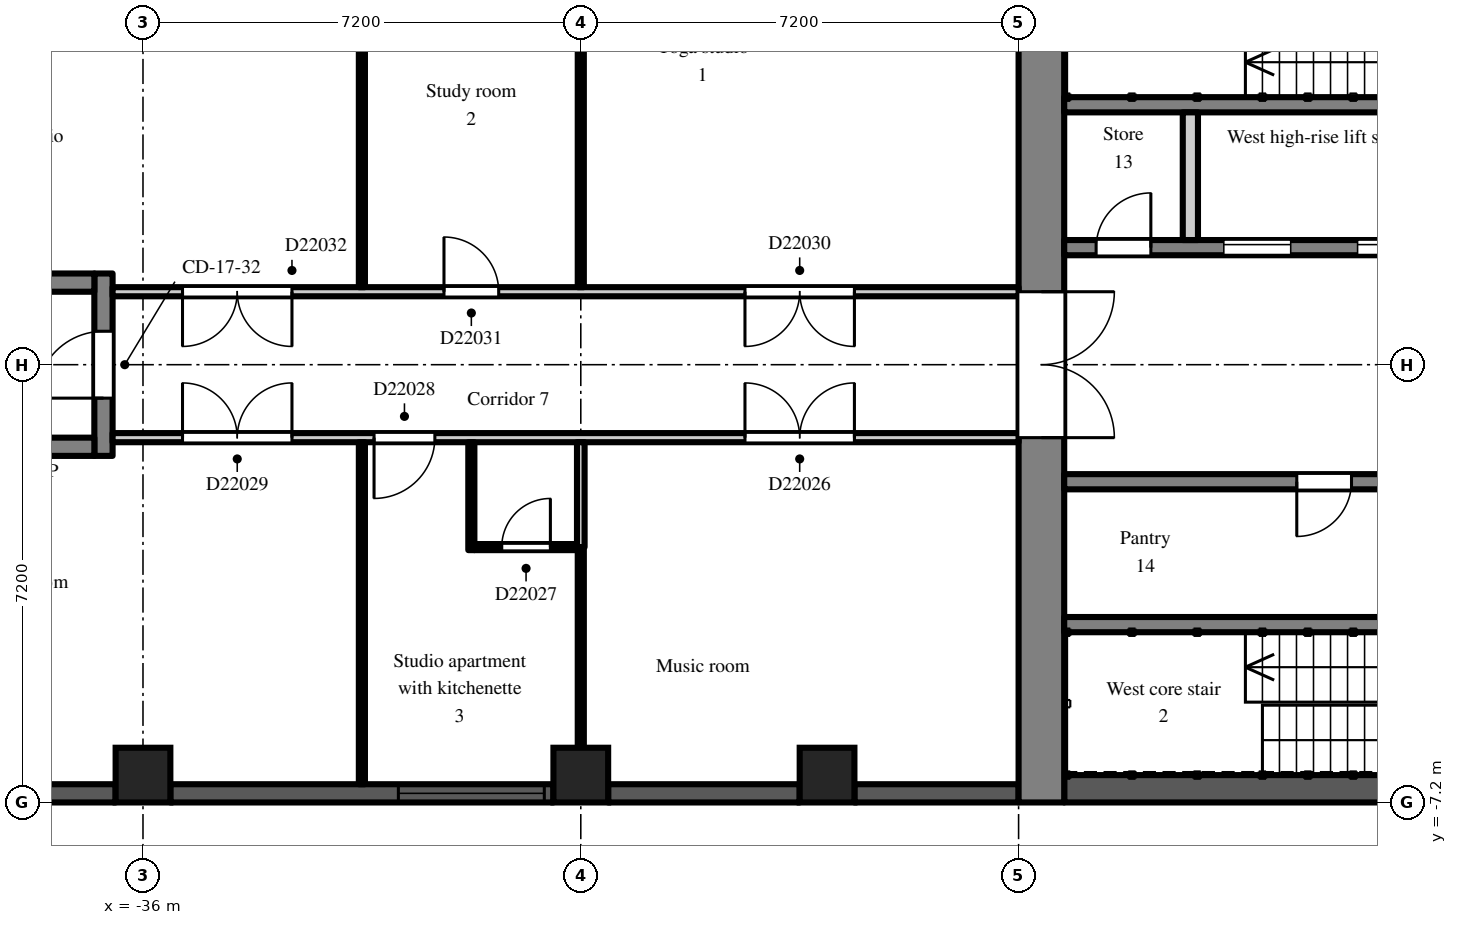
"""IFC4 building model, lengths in metres.
Left out: names, types, materials, properties, quantities, classifications, styles, units other than length and angle.
Written with IfcOpenShell. Run it as: python <this file> out.ifc"""

import sys

from ifc_helpers import new_model, si_unit, direction, frame, frame_2d, origin, origin_2d, place, context, subcontext, project, spatial, rectangle, extrude, element, fill, save


model = new_model("IFC4")
c1 = context("Model", 3, precision=1e-05, world=origin(), true_north=direction((0.0, 1.0)))
c2 = subcontext(c1, "Body", "Model", "MODEL_VIEW")
j1 = project(units=[si_unit("LENGTHUNIT", "METRE"), si_unit("PLANEANGLEUNIT", "RADIAN")], contexts=[c1])
p1 = place(None, origin())
s1 = spatial("IfcSite", under=j1, at=p1, CompositionType="ELEMENT")
p2 = place(p1, origin())
s2 = spatial("IfcBuilding", under=s1, at=p2, CompositionType="ELEMENT")
p3 = place(p2, frame((0.0, 0.0, 156.3)))
s3 = spatial("IfcBuildingStorey", under=s2, at=p3, CompositionType="ELEMENT", Elevation=156.3)
for number, where, z_axis, x_axis in (
    (1, (-36.0, -6.75, 0.0), (0.0, 0.0, 1.0), (1.0, 0.0, 0.0)),
    (2, (-28.8, -6.75, 0.0), (0.0, 0.0, 1.0), (1.0, 0.0, 0.0)),
    (3, (-24.75, -6.75, 0.0), (0.0, 0.0, 1.0), (1.0, 0.0, 0.0)),
):
    element("IfcColumn", number, at=place(p3, frame(where, z_axis=z_axis, x_axis=x_axis)), inside=s3, PredefinedType="COLUMN", context=c2, shape_type="SweptSolid", body=[
        extrude(rectangle(XDim=0.9, YDim=0.9, at=origin_2d()), origin(), (0.0, 0.0, 1.0), 3.0),
    ])
p4 = place(p3, frame((-38.7, -7.05, 0.0), z_axis=(0.0, 0.0, 1.0), x_axis=(1.0, 0.0, 0.0)))
e4 = element("IfcWall", 4, at=p4, inside=s3, PredefinedType="SOLIDWALL", context=c2, shape_type="SweptSolid", body=[
    extrude(rectangle(XDim=2.25, YDim=0.3, at=frame_2d((1.125, 0.0))), origin(), (0.0, 0.0, 1.0), 2.2),
])
p5 = place(p3, frame((-35.55, -7.05, 0.0), z_axis=(0.0, 0.0, 1.0), x_axis=(1.0, 0.0, 0.0)))
e5 = element("IfcWall", 5, at=p5, inside=s3, PredefinedType="SOLIDWALL", context=c2, shape_type="SweptSolid", body=[
    extrude(rectangle(XDim=6.3, YDim=0.3, at=frame_2d((3.15, 0.0))), origin(), (0.0, 0.0, 1.0), 2.2),
])
p6 = place(p5, frame((3.75, 0.0, 0.2)))
e6 = element("IfcOpeningElement", 6, at=p6, cuts=e5, PredefinedType="OPENING", context=c2, shape_type="SweptSolid", body=[
    extrude(rectangle(XDim=2.4, YDim=1.85, at=frame_2d((1.2, 0.925))), frame((0.0, 0.16, 0.0), z_axis=(0.0, -1.0, 0.0), x_axis=(1.0, 0.0, 0.0)), (0.0, 0.0, 1.0), 0.32),
])
p7 = place(p3, frame((-28.35, -7.05, 0.0), z_axis=(0.0, 0.0, 1.0), x_axis=(1.0, 0.0, 0.0)))
e7 = element("IfcWall", 7, at=p7, inside=s3, PredefinedType="SOLIDWALL", context=c2, shape_type="SweptSolid", body=[
    extrude(rectangle(XDim=3.15, YDim=0.3, at=frame_2d((1.575, 0.0))), origin(), (0.0, 0.0, 1.0), 2.2),
])
p8 = place(p3, frame((-24.3, -7.05, 0.0), z_axis=(0.0, 0.0, 1.0), x_axis=(1.0, 0.0, 0.0)))
e8 = element("IfcWall", 8, at=p8, inside=s3, PredefinedType="SOLIDWALL", context=c2, shape_type="SweptSolid", body=[
    extrude(rectangle(XDim=2.7, YDim=0.3, at=frame_2d((1.35, 0.0))), origin(), (0.0, 0.0, 1.0), 2.2),
])
p9 = place(p3, frame((-21.225, -7.2, 0.0), z_axis=(0.0, 0.0, 1.0), x_axis=(0.0, 1.0, 0.0)))
e9 = element("IfcWall", 9, at=p9, inside=s3, PredefinedType="SHEAR", context=c2, shape_type="SweptSolid", body=[
    extrude(rectangle(XDim=14.4, YDim=0.75, at=frame_2d((7.2, 0.0))), origin(), (0.0, 0.0, 1.0), 2.6),
])
p10 = place(p9, frame((6.0, 0.0, 0.0)))
e10 = element("IfcOpeningElement", 10, at=p10, cuts=e9, PredefinedType="OPENING", context=c2, shape_type="SweptSolid", body=[
    extrude(rectangle(XDim=2.4, YDim=2.2, at=frame_2d((1.2, 1.1))), frame((0.0, 0.385, 0.0), z_axis=(0.0, -1.0, 0.0), x_axis=(1.0, 0.0, 0.0)), (0.0, 0.0, 1.0), 0.77),
])
p11 = place(p3, frame((-7.9, 1.925, 0.0), z_axis=(0.0, 0.0, 1.0), x_axis=(-1.0, 0.0, 0.0)))
e11 = element("IfcWall", 11, at=p11, inside=s3, PredefinedType="SHEAR", context=c2, shape_type="SweptSolid", body=[
    extrude(rectangle(XDim=12.95, YDim=0.25, at=frame_2d((6.475, 0.0))), origin(), (0.0, 0.0, 1.0), 2.6),
])
p12 = place(p11, frame((4.825, 0.0, 0.0)))
e12 = element("IfcOpeningElement", 12, at=p12, cuts=e11, PredefinedType="OPENING", context=c2, shape_type="SweptSolid", body=[
    extrude(rectangle(XDim=1.1, YDim=2.1, at=frame_2d((0.55, 1.05))), frame((0.0, 0.135, 0.0), z_axis=(0.0, -1.0, 0.0), x_axis=(1.0, 0.0, 0.0)), (0.0, 0.0, 1.0), 0.27),
])
p13 = place(p11, frame((7.025, 0.0, 0.0)))
e13 = element("IfcOpeningElement", 13, at=p13, cuts=e11, PredefinedType="OPENING", context=c2, shape_type="SweptSolid", body=[
    extrude(rectangle(XDim=1.1, YDim=2.1, at=frame_2d((0.55, 1.05))), frame((0.0, 0.135, 0.0), z_axis=(0.0, -1.0, 0.0), x_axis=(1.0, 0.0, 0.0)), (0.0, 0.0, 1.0), 0.27),
])
p14 = place(p11, frame((9.225, 0.0, 0.0)))
e14 = element("IfcOpeningElement", 14, at=p14, cuts=e11, PredefinedType="OPENING", context=c2, shape_type="SweptSolid", body=[
    extrude(rectangle(XDim=1.1, YDim=2.1, at=frame_2d((0.55, 1.05))), frame((0.0, 0.135, 0.0), z_axis=(0.0, -1.0, 0.0), x_axis=(1.0, 0.0, 0.0)), (0.0, 0.0, 1.0), 0.27),
])
p15 = place(p11, frame((0.525, 0.0, 0.0)))
e15 = element("IfcOpeningElement", 15, at=p15, cuts=e11, PredefinedType="OPENING", context=c2, shape_type="SweptSolid", body=[
    extrude(rectangle(XDim=0.9, YDim=2.1, at=frame_2d((0.45, 1.05))), frame((0.0, 0.135, 0.0), z_axis=(0.0, -1.0, 0.0), x_axis=(1.0, 0.0, 0.0)), (0.0, 0.0, 1.0), 0.27),
])
p16 = place(p11, frame((2.625, 0.0, 0.0)))
e16 = element("IfcOpeningElement", 16, at=p16, cuts=e11, PredefinedType="OPENING", context=c2, shape_type="SweptSolid", body=[
    extrude(rectangle(XDim=1.1, YDim=2.1, at=frame_2d((0.55, 1.05))), frame((0.0, 0.135, 0.0), z_axis=(0.0, -1.0, 0.0), x_axis=(1.0, 0.0, 0.0)), (0.0, 0.0, 1.0), 0.27),
])
p17 = place(p11, frame((11.525, 0.0, 0.0)))
e17 = element("IfcOpeningElement", 17, at=p17, cuts=e11, PredefinedType="OPENING", context=c2, shape_type="SweptSolid", body=[
    extrude(rectangle(XDim=0.9, YDim=2.1, at=frame_2d((0.45, 1.05))), frame((0.0, 0.135, 0.0), z_axis=(0.0, -1.0, 0.0), x_axis=(1.0, 0.0, 0.0)), (0.0, 0.0, 1.0), 0.27),
])
p18 = place(p3, frame((-12.3, 4.275, 0.0), z_axis=(0.0, 0.0, 1.0), x_axis=(-1.0, 0.0, 0.0)))
e18 = element("IfcWall", 18, at=p18, inside=s3, PredefinedType="SHEAR", context=c2, shape_type="SweptSolid", body=[
    extrude(rectangle(XDim=8.55, YDim=0.25, at=frame_2d((4.275, 0.0))), origin(), (0.0, 0.0, 1.0), 2.6),
])
p19 = place(p3, frame((-18.775, 2.05, 0.0), z_axis=(0.0, 0.0, 1.0), x_axis=(0.0, 1.0, 0.0)))
e19 = element("IfcWall", 19, at=p19, inside=s3, PredefinedType="PARTITIONING", context=c2, shape_type="SweptSolid", body=[
    extrude(rectangle(XDim=2.1, YDim=0.25, at=frame_2d((1.05, 0.0))), origin(), (0.0, 0.0, 1.0), 2.6),
])
p20 = place(p3, frame((-7.9, -6.975, 0.0), z_axis=(0.0, 0.0, 1.0), x_axis=(-1.0, 0.0, 0.0)))
e20 = element("IfcWall", 20, at=p20, inside=s3, PredefinedType="SHEAR", context=c2, shape_type="SweptSolid", body=[
    extrude(rectangle(XDim=12.95, YDim=0.45, at=frame_2d((6.475, 0.0))), origin(), (0.0, 0.0, 1.0), 2.6),
])
p21 = place(p3, frame((-7.9, -1.925, 0.0), z_axis=(0.0, 0.0, 1.0), x_axis=(-1.0, 0.0, 0.0)))
e21 = element("IfcWall", 21, at=p21, inside=s3, PredefinedType="SHEAR", context=c2, shape_type="SweptSolid", body=[
    extrude(rectangle(XDim=12.95, YDim=0.25, at=frame_2d((6.475, 0.0))), origin(), (0.0, 0.0, 1.0), 2.6),
])
p22 = place(p21, frame((0.525, 0.0, 0.0)))
e22 = element("IfcOpeningElement", 22, at=p22, cuts=e21, PredefinedType="OPENING", context=c2, shape_type="SweptSolid", body=[
    extrude(rectangle(XDim=0.9, YDim=2.1, at=frame_2d((0.45, 1.05))), frame((0.0, 0.135, 0.0), z_axis=(0.0, -1.0, 0.0), x_axis=(1.0, 0.0, 0.0)), (0.0, 0.0, 1.0), 0.27),
])
p23 = place(p21, frame((2.625, 0.0, 0.0)))
e23 = element("IfcOpeningElement", 23, at=p23, cuts=e21, PredefinedType="OPENING", context=c2, shape_type="SweptSolid", body=[
    extrude(rectangle(XDim=1.1, YDim=2.1, at=frame_2d((0.55, 1.05))), frame((0.0, 0.135, 0.0), z_axis=(0.0, -1.0, 0.0), x_axis=(1.0, 0.0, 0.0)), (0.0, 0.0, 1.0), 0.27),
])
p24 = place(p21, frame((8.225, 0.0, 0.0)))
e24 = element("IfcOpeningElement", 24, at=p24, cuts=e21, PredefinedType="OPENING", context=c2, shape_type="SweptSolid", body=[
    extrude(rectangle(XDim=0.9, YDim=2.1, at=frame_2d((0.45, 1.05))), frame((0.0, 0.135, 0.0), z_axis=(0.0, -1.0, 0.0), x_axis=(1.0, 0.0, 0.0)), (0.0, 0.0, 1.0), 0.27),
])
p25 = place(p3, frame((-12.3, -4.275, 0.0), z_axis=(0.0, 0.0, 1.0), x_axis=(-1.0, 0.0, 0.0)))
e25 = element("IfcWall", 25, at=p25, inside=s3, PredefinedType="SHEAR", context=c2, shape_type="SweptSolid", body=[
    extrude(rectangle(XDim=8.55, YDim=0.25, at=frame_2d((4.275, 0.0))), origin(), (0.0, 0.0, 1.0), 2.6),
])
p26 = place(p3, frame((-36.65, -1.5, 0.0), z_axis=(0.0, 0.0, 1.0), x_axis=(0.0, 1.0, 0.0)))
e26 = element("IfcWall", 26, at=p26, inside=s3, PredefinedType="SHEAR", context=c2, shape_type="SweptSolid", body=[
    extrude(rectangle(XDim=3.0, YDim=0.3, at=frame_2d((1.5, 0.0))), origin(), (0.0, 0.0, 1.0), 2.6),
])
p27 = place(p26, frame((0.95, 0.0, 0.0)))
e27 = element("IfcOpeningElement", 27, at=p27, cuts=e26, PredefinedType="OPENING", context=c2, shape_type="SweptSolid", body=[
    extrude(rectangle(XDim=1.1, YDim=2.1, at=frame_2d((0.55, 1.05))), frame((0.0, 0.16, 0.0), z_axis=(0.0, -1.0, 0.0), x_axis=(1.0, 0.0, 0.0)), (0.0, 0.0, 1.0), 0.32),
])
for number, where, z_axis, x_axis in (
    (28, (-36.8, -1.35, 0.0), (0.0, 0.0, 1.0), (-1.0, 0.0, 0.0)),
    (29, (-36.8, 1.35, 0.0), (0.0, 0.0, 1.0), (-1.0, 0.0, 0.0)),
):
    element("IfcWall", number, at=place(p3, frame(where, z_axis=z_axis, x_axis=x_axis)), inside=s3, PredefinedType="SHEAR", context=c2, shape_type="SweptSolid", body=[
        extrude(rectangle(XDim=5.8, YDim=0.3, at=frame_2d((2.9, 0.0))), origin(), (0.0, 0.0, 1.0), 2.6),
    ])
p28 = place(p3, frame((-36.5, -1.2, 0.0), z_axis=(0.0, 0.0, 1.0), x_axis=(1.0, 0.0, 0.0)))
e30 = element("IfcWall", 30, at=p28, inside=s3, PredefinedType="PARTITIONING", context=c2, shape_type="SweptSolid", body=[
    extrude(rectangle(XDim=14.9, YDim=0.15, at=frame_2d((7.45, 0.0))), origin(), (0.0, 0.0, 1.0), 2.6),
])
p29 = place(p28, frame((10.4, 0.0, 0.0)))
e31 = element("IfcOpeningElement", 31, at=p29, cuts=e30, PredefinedType="OPENING", context=c2, shape_type="SweptSolid", body=[
    extrude(rectangle(XDim=1.8, YDim=2.1, at=frame_2d((0.9, 1.05))), frame((0.0, 0.085, 0.0), z_axis=(0.0, -1.0, 0.0), x_axis=(1.0, 0.0, 0.0)), (0.0, 0.0, 1.0), 0.17),
])
p30 = place(p28, frame((4.3, 0.0, 0.0)))
e32 = element("IfcOpeningElement", 32, at=p30, cuts=e30, PredefinedType="OPENING", context=c2, shape_type="SweptSolid", body=[
    extrude(rectangle(XDim=1.0, YDim=2.1, at=frame_2d((0.5, 1.05))), frame((0.0, 0.085, 0.0), z_axis=(0.0, -1.0, 0.0), x_axis=(1.0, 0.0, 0.0)), (0.0, 0.0, 1.0), 0.17),
])
p31 = place(p28, frame((1.15, 0.0, 0.0)))
e33 = element("IfcOpeningElement", 33, at=p31, cuts=e30, PredefinedType="OPENING", context=c2, shape_type="SweptSolid", body=[
    extrude(rectangle(XDim=1.8, YDim=2.1, at=frame_2d((0.9, 1.05))), frame((0.0, 0.085, 0.0), z_axis=(0.0, -1.0, 0.0), x_axis=(1.0, 0.0, 0.0)), (0.0, 0.0, 1.0), 0.17),
])
p32 = place(p3, frame((-36.5, 1.2, 0.0), z_axis=(0.0, 0.0, 1.0), x_axis=(1.0, 0.0, 0.0)))
e34 = element("IfcWall", 34, at=p32, inside=s3, PredefinedType="PARTITIONING", context=c2, shape_type="SweptSolid", body=[
    extrude(rectangle(XDim=14.9, YDim=0.15, at=frame_2d((7.45, 0.0))), origin(), (0.0, 0.0, 1.0), 2.6),
])
p33 = place(p32, frame((10.4, 0.0, 0.0)))
e35 = element("IfcOpeningElement", 35, at=p33, cuts=e34, PredefinedType="OPENING", context=c2, shape_type="SweptSolid", body=[
    extrude(rectangle(XDim=1.8, YDim=2.1, at=frame_2d((0.9, 1.05))), frame((0.0, 0.085, 0.0), z_axis=(0.0, -1.0, 0.0), x_axis=(1.0, 0.0, 0.0)), (0.0, 0.0, 1.0), 0.17),
])
p34 = place(p32, frame((5.45, 0.0, 0.0)))
e36 = element("IfcOpeningElement", 36, at=p34, cuts=e34, PredefinedType="OPENING", context=c2, shape_type="SweptSolid", body=[
    extrude(rectangle(XDim=0.9, YDim=2.1, at=frame_2d((0.45, 1.05))), frame((0.0, 0.085, 0.0), z_axis=(0.0, -1.0, 0.0), x_axis=(1.0, 0.0, 0.0)), (0.0, 0.0, 1.0), 0.17),
])
p35 = place(p32, frame((1.15, 0.0, 0.0)))
e37 = element("IfcOpeningElement", 37, at=p35, cuts=e34, PredefinedType="OPENING", context=c2, shape_type="SweptSolid", body=[
    extrude(rectangle(XDim=1.8, YDim=2.1, at=frame_2d((0.9, 1.05))), frame((0.0, 0.085, 0.0), z_axis=(0.0, -1.0, 0.0), x_axis=(1.0, 0.0, 0.0)), (0.0, 0.0, 1.0), 0.17),
])
for number, where, z_axis, x_axis in (
    (38, (-32.4, -6.9, 0.0), (0.0, 0.0, 1.0), (0.0, 1.0, 0.0)),
    (39, (-32.4, 1.275, 0.0), (0.0, 0.0, 1.0), (0.0, 1.0, 0.0)),
):
    element("IfcWall", number, at=place(p3, frame(where, z_axis=z_axis, x_axis=x_axis)), inside=s3, PredefinedType="PARTITIONING", context=c2, shape_type="SweptSolid", body=[
        extrude(rectangle(XDim=5.625, YDim=0.1, at=frame_2d((2.812, 0.0))), origin(), (0.0, 0.0, 1.0), 2.6),
    ])
p36 = place(p3, frame((-30.6, -3.05, 0.0), z_axis=(0.0, 0.0, 1.0), x_axis=(0.0, 1.0, 0.0)))
e40 = element("IfcWall", 40, at=p36, inside=s3, PredefinedType="PARTITIONING", context=c2, shape_type="SweptSolid", body=[
    extrude(rectangle(XDim=1.775, YDim=0.1, at=frame_2d((0.888, 0.0))), origin(), (0.0, 0.0, 1.0), 2.6),
])
p37 = place(p3, frame((-30.55, -3.0, 0.0), z_axis=(0.0, 0.0, 1.0), x_axis=(1.0, 0.0, 0.0)))
e41 = element("IfcWall", 41, at=p37, inside=s3, PredefinedType="PARTITIONING", context=c2, shape_type="SweptSolid", body=[
    extrude(rectangle(XDim=1.688, YDim=0.1, at=frame_2d((0.844, 0.0))), origin(), (0.0, 0.0, 1.0), 2.6),
])
p38 = place(p37, frame((0.45, 0.0, 0.0)))
e42 = element("IfcOpeningElement", 42, at=p38, cuts=e41, PredefinedType="OPENING", context=c2, shape_type="SweptSolid", body=[
    extrude(rectangle(XDim=0.8, YDim=2.1, at=frame_2d((0.4, 1.05))), frame((0.0, 0.06, 0.0), z_axis=(0.0, -1.0, 0.0), x_axis=(1.0, 0.0, 0.0)), (0.0, 0.0, 1.0), 0.12),
])
p39 = place(p3, frame((-28.8, -6.9, 0.0), z_axis=(0.0, 0.0, 1.0), x_axis=(0.0, 1.0, 0.0)))
e43 = element("IfcWall", 43, at=p39, inside=s3, PredefinedType="PARTITIONING", context=c2, shape_type="SweptSolid", body=[
    extrude(rectangle(XDim=3.9, YDim=0.1, at=frame_2d((1.95, 0.0))), origin(), (0.0, 0.0, 1.0), 2.6),
])
p40 = place(p3, frame((-28.8, -3.0, 0.0), z_axis=(0.0, 0.0, 1.0), x_axis=(0.0, 1.0, 0.0)))
e44 = element("IfcWall", 44, at=p40, inside=s3, PredefinedType="PARTITIONING", context=c2, shape_type="SweptSolid", body=[
    extrude(rectangle(XDim=1.725, YDim=0.125, at=frame_2d((0.863, 0.0))), origin(), (0.0, 0.0, 1.0), 2.6),
])
p41 = place(p3, frame((-28.8, 1.275, 0.0), z_axis=(0.0, 0.0, 1.0), x_axis=(0.0, 1.0, 0.0)))
e45 = element("IfcWall", 45, at=p41, inside=s3, PredefinedType="PARTITIONING", context=c2, shape_type="SweptSolid", body=[
    extrude(rectangle(XDim=5.625, YDim=0.1, at=frame_2d((2.812, 0.0))), origin(), (0.0, 0.0, 1.0), 2.6),
])
p42 = place(p6, origin())
e46 = element("IfcWindow", 46, at=p42, inside=s3, PartitioningType="SINGLE_PANEL", PredefinedType="WINDOW", context=c2, shape_type="SweptSolid", body=[
    extrude(rectangle(XDim=2.4, YDim=1.85, at=frame_2d((1.2, 0.925))), frame((0.0, 0.03, 0.0), z_axis=(0.0, -1.0, 0.0), x_axis=(1.0, 0.0, 0.0)), (0.0, 0.0, 1.0), 0.06),
])
fill(e6, e46)
p43 = place(p13, origin())
e47 = element("IfcDoor", 47, at=p43, inside=s3, OperationType="SLIDING_TO_LEFT", PredefinedType="DOOR", context=c2, shape_type="SweptSolid", body=[
    extrude(rectangle(XDim=1.1, YDim=2.1, at=frame_2d((0.55, 1.05))), frame((0.0, 0.025, 0.0), z_axis=(0.0, -1.0, 0.0), x_axis=(1.0, 0.0, 0.0)), (0.0, 0.0, 1.0), 0.05),
])
fill(e13, e47)
p44 = place(p14, origin())
e48 = element("IfcDoor", 48, at=p44, inside=s3, OperationType="SLIDING_TO_LEFT", PredefinedType="DOOR", context=c2, shape_type="SweptSolid", body=[
    extrude(rectangle(XDim=1.1, YDim=2.1, at=frame_2d((0.55, 1.05))), frame((0.0, 0.025, 0.0), z_axis=(0.0, -1.0, 0.0), x_axis=(1.0, 0.0, 0.0)), (0.0, 0.0, 1.0), 0.05),
])
fill(e14, e48)
p45 = place(p10, frame((2.4, 0.0, 0.0), z_axis=(0.0, 0.0, 1.0), x_axis=(-1.0, 0.0, 0.0)))
e49 = element("IfcDoor", 49, at=p45, inside=s3, OperationType="DOUBLE_DOOR_DOUBLE_SWING", PredefinedType="DOOR", context=c2, shape_type="SweptSolid", body=[
    extrude(rectangle(XDim=2.4, YDim=2.2, at=frame_2d((1.2, 1.1))), frame((0.0, 0.025, 0.0), z_axis=(0.0, -1.0, 0.0), x_axis=(1.0, 0.0, 0.0)), (0.0, 0.0, 1.0), 0.05),
])
fill(e10, e49)
p46 = place(p17, frame((0.9, 0.0, 0.0), z_axis=(0.0, 0.0, 1.0), x_axis=(-1.0, 0.0, 0.0)))
e50 = element("IfcDoor", 50, at=p46, inside=s3, OperationType="SINGLE_SWING_RIGHT", PredefinedType="DOOR", context=c2, shape_type="SweptSolid", body=[
    extrude(rectangle(XDim=0.9, YDim=2.1, at=frame_2d((0.45, 1.05))), frame((0.0, 0.025, 0.0), z_axis=(0.0, -1.0, 0.0), x_axis=(1.0, 0.0, 0.0)), (0.0, 0.0, 1.0), 0.05),
])
fill(e17, e50)
p47 = place(p24, origin())
e51 = element("IfcDoor", 51, at=p47, inside=s3, OperationType="SINGLE_SWING_RIGHT", PredefinedType="DOOR", context=c2, shape_type="SweptSolid", body=[
    extrude(rectangle(XDim=0.9, YDim=2.1, at=frame_2d((0.45, 1.05))), frame((0.0, 0.025, 0.0), z_axis=(0.0, -1.0, 0.0), x_axis=(1.0, 0.0, 0.0)), (0.0, 0.0, 1.0), 0.05),
])
fill(e24, e51)
p48 = place(p27, origin())
e52 = element("IfcDoor", 52, at=p48, inside=s3, OperationType="SINGLE_SWING_LEFT", PredefinedType="DOOR", context=c2, shape_type="SweptSolid", body=[
    extrude(rectangle(XDim=1.1, YDim=2.1, at=frame_2d((0.55, 1.05))), frame((0.0, 0.025, 0.0), z_axis=(0.0, -1.0, 0.0), x_axis=(1.0, 0.0, 0.0)), (0.0, 0.0, 1.0), 0.05),
])
fill(e27, e52)
p49 = place(p29, origin())
e53 = element("IfcDoor", 53, at=p49, inside=s3, OperationType="DOUBLE_DOOR_DOUBLE_SWING", PredefinedType="DOOR", context=c2, shape_type="SweptSolid", body=[
    extrude(rectangle(XDim=1.8, YDim=2.1, at=frame_2d((0.9, 1.05))), frame((0.0, 0.025, 0.0), z_axis=(0.0, -1.0, 0.0), x_axis=(1.0, 0.0, 0.0)), (0.0, 0.0, 1.0), 0.05),
])
fill(e31, e53)
p50 = place(p38, origin())
e54 = element("IfcDoor", 54, at=p50, inside=s3, OperationType="SINGLE_SWING_RIGHT", PredefinedType="DOOR", context=c2, shape_type="SweptSolid", body=[
    extrude(rectangle(XDim=0.8, YDim=2.1, at=frame_2d((0.4, 1.05))), frame((0.0, 0.025, 0.0), z_axis=(0.0, -1.0, 0.0), x_axis=(1.0, 0.0, 0.0)), (0.0, 0.0, 1.0), 0.05),
])
fill(e42, e54)
p51 = place(p30, frame((1.0, 0.0, 0.0), z_axis=(0.0, 0.0, 1.0), x_axis=(-1.0, 0.0, 0.0)))
e55 = element("IfcDoor", 55, at=p51, inside=s3, OperationType="SINGLE_SWING_RIGHT", PredefinedType="DOOR", context=c2, shape_type="SweptSolid", body=[
    extrude(rectangle(XDim=1.0, YDim=2.1, at=frame_2d((0.5, 1.05))), frame((0.0, 0.025, 0.0), z_axis=(0.0, -1.0, 0.0), x_axis=(1.0, 0.0, 0.0)), (0.0, 0.0, 1.0), 0.05),
])
fill(e32, e55)
p52 = place(p31, origin())
e56 = element("IfcDoor", 56, at=p52, inside=s3, OperationType="DOUBLE_DOOR_DOUBLE_SWING", PredefinedType="DOOR", context=c2, shape_type="SweptSolid", body=[
    extrude(rectangle(XDim=1.8, YDim=2.1, at=frame_2d((0.9, 1.05))), frame((0.0, 0.025, 0.0), z_axis=(0.0, -1.0, 0.0), x_axis=(1.0, 0.0, 0.0)), (0.0, 0.0, 1.0), 0.05),
])
fill(e33, e56)
p53 = place(p33, frame((1.8, 0.0, 0.0), z_axis=(0.0, 0.0, 1.0), x_axis=(-1.0, 0.0, 0.0)))
e57 = element("IfcDoor", 57, at=p53, inside=s3, OperationType="DOUBLE_DOOR_DOUBLE_SWING", PredefinedType="DOOR", context=c2, shape_type="SweptSolid", body=[
    extrude(rectangle(XDim=1.8, YDim=2.1, at=frame_2d((0.9, 1.05))), frame((0.0, 0.025, 0.0), z_axis=(0.0, -1.0, 0.0), x_axis=(1.0, 0.0, 0.0)), (0.0, 0.0, 1.0), 0.05),
])
fill(e35, e57)
p54 = place(p34, origin())
e58 = element("IfcDoor", 58, at=p54, inside=s3, OperationType="SINGLE_SWING_LEFT", PredefinedType="DOOR", context=c2, shape_type="SweptSolid", body=[
    extrude(rectangle(XDim=0.9, YDim=2.1, at=frame_2d((0.45, 1.05))), frame((0.0, 0.025, 0.0), z_axis=(0.0, -1.0, 0.0), x_axis=(1.0, 0.0, 0.0)), (0.0, 0.0, 1.0), 0.05),
])
fill(e36, e58)
p55 = place(p35, frame((1.8, 0.0, 0.0), z_axis=(0.0, 0.0, 1.0), x_axis=(-1.0, 0.0, 0.0)))
e59 = element("IfcDoor", 59, at=p55, inside=s3, OperationType="DOUBLE_DOOR_DOUBLE_SWING", PredefinedType="DOOR", context=c2, shape_type="SweptSolid", body=[
    extrude(rectangle(XDim=1.8, YDim=2.1, at=frame_2d((0.9, 1.05))), frame((0.0, 0.025, 0.0), z_axis=(0.0, -1.0, 0.0), x_axis=(1.0, 0.0, 0.0)), (0.0, 0.0, 1.0), 0.05),
])
fill(e37, e59)
save(model, sys.argv[1])
